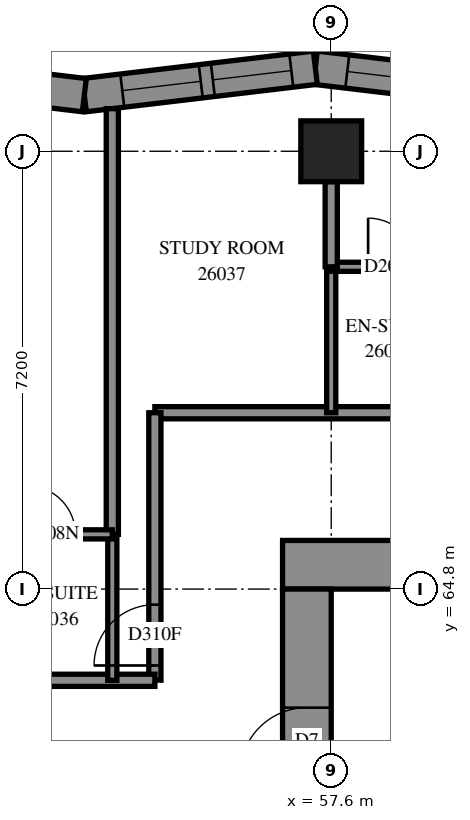
"""IFC4 building model, lengths in metres.
Left out: names, types, materials, properties, quantities, classifications, styles, units other than length and angle.
Written with IfcOpenShell. Run it as: python <this file> out.ifc"""

import sys

from ifc_helpers import new_model, si_unit, direction, frame, frame_2d, origin, origin_2d, place, context, subcontext, project, spatial, polyline, rectangle, outline, extrude, element, fill, save


model = new_model("IFC4")
c1 = context("Model", 3, precision=1e-05, world=origin(), true_north=direction((0.0, 1.0)))
c2 = subcontext(c1, "Body", "Model", "MODEL_VIEW")
j1 = project(units=[si_unit("LENGTHUNIT", "METRE"), si_unit("PLANEANGLEUNIT", "RADIAN")], contexts=[c1])
p1 = place(None, origin())
s1 = spatial("IfcSite", under=j1, at=p1, CompositionType="ELEMENT")
p2 = place(p1, origin())
s2 = spatial("IfcBuilding", under=s1, at=p2, CompositionType="ELEMENT")
p3 = place(p2, frame((0.0, 0.0, 98.2)))
s3 = spatial("IfcBuildingStorey", under=s2, at=p3, CompositionType="ELEMENT", Elevation=98.2)
p4 = place(p3, frame((57.6, 72.0, 0.0), z_axis=(0.0, 0.0, 1.0), x_axis=(1.0, 0.0, 0.0)))
e1 = element("IfcColumn", 1, at=p4, inside=s3, PredefinedType="COLUMN", context=c2, shape_type="SweptSolid", body=[
    extrude(rectangle(XDim=1.0, YDim=1.0, at=origin_2d()), origin(), (0.0, 0.0, 1.0), 3.1),
])
p5 = place(p3, frame((56.8, 65.2, -0.3), z_axis=(0.0, 0.0, 1.0), x_axis=(1.0, 0.0, 0.0)))
e2 = element("IfcWall", 2, at=p5, inside=s3, PredefinedType="SHEAR", context=c2, shape_type="SweptSolid", body=[
    extrude(rectangle(XDim=16.0, YDim=0.8, at=frame_2d((8.0, 0.0))), origin(), (0.0, 0.0, 1.0), 2.7),
])
p6 = place(p5, frame((10.8, 0.0, 0.3)))
e3 = element("IfcOpeningElement", 3, at=p6, cuts=e2, PredefinedType="OPENING", context=c2, shape_type="SweptSolid", body=[
    extrude(rectangle(XDim=0.8, YDim=2.1, at=frame_2d((0.4, 1.05))), frame((0.0, 0.41, 0.0), z_axis=(0.0, -1.0, 0.0), x_axis=(1.0, 0.0, 0.0)), (0.0, 0.0, 1.0), 0.82),
])
p7 = place(p3, frame((57.2, 50.4, -0.3), z_axis=(0.0, 0.0, 1.0), x_axis=(0.0, 1.0, 0.0)))
e4 = element("IfcWall", 4, at=p7, inside=s3, PredefinedType="SHEAR", context=c2, shape_type="SweptSolid", body=[
    extrude(rectangle(XDim=14.4, YDim=0.8, at=frame_2d((7.2, 0.0))), origin(), (0.0, 0.0, 1.0), 2.7),
])
p8 = place(p7, frame((4.55, 0.0, 0.3)))
e5 = element("IfcOpeningElement", 5, at=p8, cuts=e4, PredefinedType="OPENING", context=c2, shape_type="SweptSolid", body=[
    extrude(rectangle(XDim=1.1, YDim=2.1, at=frame_2d((0.55, 1.05))), frame((0.0, 0.41, 0.0), z_axis=(0.0, -1.0, 0.0), x_axis=(1.0, 0.0, 0.0)), (0.0, 0.0, 1.0), 0.82),
])
p9 = place(p7, frame((11.35, 0.0, 0.3)))
e6 = element("IfcOpeningElement", 6, at=p9, cuts=e4, PredefinedType="OPENING", context=c2, shape_type="SweptSolid", body=[
    extrude(rectangle(XDim=1.1, YDim=2.1, at=frame_2d((0.55, 1.05))), frame((0.0, 0.41, 0.0), z_axis=(0.0, -1.0, 0.0), x_axis=(1.0, 0.0, 0.0)), (0.0, 0.0, 1.0), 0.82),
])
p10 = place(p3, frame((61.138, 72.923, 0.0), z_axis=(0.0, 0.0, 1.0), x_axis=(-0.9930269402, 0.1178876415, 0.0)))
e7 = element("IfcWall", 7, at=p10, inside=s3, PredefinedType="SOLIDWALL", context=c2, shape_type="SweptSolid", body=[
    extrude(outline(polyline([(0.033, -0.275), (3.858, -0.275), (3.793, 0.275), (-0.033, 0.275), (0.033, -0.275)])), origin(), (0.0, 0.0, 1.0), 3.1),
])
p11 = place(p10, frame((0.496, 0.0, 0.5)))
e8 = element("IfcOpeningElement", 8, at=p11, cuts=e7, PredefinedType="OPENING", context=c2, shape_type="SweptSolid", body=[
    extrude(rectangle(XDim=1.3, YDim=2.45, at=frame_2d((0.65, 1.225))), frame((0.0, 0.285, 0.0), z_axis=(0.0, -1.0, 0.0), x_axis=(1.0, 0.0, 0.0)), (0.0, 0.0, 1.0), 0.57),
])
p12 = place(p10, frame((1.996, 0.0, 0.5)))
e9 = element("IfcOpeningElement", 9, at=p12, cuts=e7, PredefinedType="OPENING", context=c2, shape_type="SweptSolid", body=[
    extrude(rectangle(XDim=1.3, YDim=2.45, at=frame_2d((0.65, 1.225))), frame((0.0, 0.285, 0.0), z_axis=(0.0, -1.0, 0.0), x_axis=(1.0, 0.0, 0.0)), (0.0, 0.0, 1.0), 0.57),
])
p13 = place(p3, frame((57.339, 73.374, 0.0), z_axis=(0.0, 0.0, 1.0), x_axis=(-0.9930265769, -0.1178907016, 0.0)))
e10 = element("IfcWall", 10, at=p13, inside=s3, PredefinedType="SOLIDWALL", context=c2, shape_type="SweptSolid", body=[
    extrude(outline(polyline([(-0.033, -0.275), (3.793, -0.275), (3.858, 0.275), (0.033, 0.275), (-0.033, -0.275)])), origin(), (0.0, 0.0, 1.0), 3.1),
])
p14 = place(p13, frame((0.397, 0.0, 0.5)))
e11 = element("IfcOpeningElement", 11, at=p14, cuts=e10, PredefinedType="OPENING", context=c2, shape_type="SweptSolid", body=[
    extrude(rectangle(XDim=1.3, YDim=2.45, at=frame_2d((0.65, 1.225))), frame((0.0, 0.285, 0.0), z_axis=(0.0, -1.0, 0.0), x_axis=(1.0, 0.0, 0.0)), (0.0, 0.0, 1.0), 0.57),
])
p15 = place(p13, frame((1.897, 0.0, 0.5)))
e12 = element("IfcOpeningElement", 12, at=p15, cuts=e10, PredefinedType="OPENING", context=c2, shape_type="SweptSolid", body=[
    extrude(rectangle(XDim=1.3, YDim=2.45, at=frame_2d((0.65, 1.225))), frame((0.0, 0.285, 0.0), z_axis=(0.0, -1.0, 0.0), x_axis=(1.0, 0.0, 0.0)), (0.0, 0.0, 1.0), 0.57),
])
p16 = place(p3, frame((53.54, 72.923, 0.0), z_axis=(0.0, 0.0, 1.0), x_axis=(-0.9930269402, 0.1178876415, 0.0)))
e13 = element("IfcWall", 13, at=p16, inside=s3, PredefinedType="SOLIDWALL", context=c2, shape_type="SweptSolid", body=[
    extrude(outline(polyline([(0.033, -0.275), (3.858, -0.275), (3.793, 0.275), (-0.033, 0.275), (0.033, -0.275)])), origin(), (0.0, 0.0, 1.0), 3.1),
])
p17 = place(p16, frame((1.081, 0.0, 0.5)))
e14 = element("IfcOpeningElement", 14, at=p17, cuts=e13, PredefinedType="OPENING", context=c2, shape_type="SweptSolid", body=[
    extrude(rectangle(XDim=1.2, YDim=2.45, at=frame_2d((0.6, 1.225))), frame((0.0, 0.285, 0.0), z_axis=(0.0, -1.0, 0.0), x_axis=(1.0, 0.0, 0.0)), (0.0, 0.0, 1.0), 0.57),
])
p18 = place(p3, frame((54.7, 67.7, 0.0), z_axis=(0.0, 0.0, 1.0), x_axis=(1.0, 0.0, 0.0)))
e15 = element("IfcWall", 15, at=p18, inside=s3, PredefinedType="PARTITIONING", context=c2, shape_type="SweptSolid", body=[
    extrude(rectangle(XDim=20.2, YDim=0.2, at=frame_2d((10.1, 0.0))), origin(), (0.0, 0.0, 1.0), 3.1),
])
p19 = place(p18, frame((5.25, 0.0, 0.0)))
e16 = element("IfcOpeningElement", 16, at=p19, cuts=e15, PredefinedType="OPENING", context=c2, shape_type="SweptSolid", body=[
    extrude(rectangle(XDim=0.9, YDim=2.1, at=frame_2d((0.45, 1.05))), frame((0.0, 0.11, 0.0), z_axis=(0.0, -1.0, 0.0), x_axis=(1.0, 0.0, 0.0)), (0.0, 0.0, 1.0), 0.22),
])
p20 = place(p18, frame((6.9, 0.0, 0.0)))
e17 = element("IfcOpeningElement", 17, at=p20, cuts=e15, PredefinedType="OPENING", context=c2, shape_type="SweptSolid", body=[
    extrude(rectangle(XDim=0.9, YDim=2.1, at=frame_2d((0.45, 1.05))), frame((0.0, 0.11, 0.0), z_axis=(0.0, -1.0, 0.0), x_axis=(1.0, 0.0, 0.0)), (0.0, 0.0, 1.0), 0.22),
])
p21 = place(p18, frame((12.45, 0.0, 0.0)))
e18 = element("IfcOpeningElement", 18, at=p21, cuts=e15, PredefinedType="OPENING", context=c2, shape_type="SweptSolid", body=[
    extrude(rectangle(XDim=0.9, YDim=2.1, at=frame_2d((0.45, 1.05))), frame((0.0, 0.11, 0.0), z_axis=(0.0, -1.0, 0.0), x_axis=(1.0, 0.0, 0.0)), (0.0, 0.0, 1.0), 0.22),
])
p22 = place(p18, frame((14.1, 0.0, 0.0)))
e19 = element("IfcOpeningElement", 19, at=p22, cuts=e15, PredefinedType="OPENING", context=c2, shape_type="SweptSolid", body=[
    extrude(rectangle(XDim=0.9, YDim=2.1, at=frame_2d((0.45, 1.05))), frame((0.0, 0.11, 0.0), z_axis=(0.0, -1.0, 0.0), x_axis=(1.0, 0.0, 0.0)), (0.0, 0.0, 1.0), 0.22),
])
p23 = place(p3, frame((54.0, 65.7, 0.0), z_axis=(0.0, 0.0, 1.0), x_axis=(0.0, 1.0, 0.0)))
e20 = element("IfcWall", 20, at=p23, inside=s3, PredefinedType="PARTITIONING", context=c2, shape_type="SweptSolid", body=[
    extrude(rectangle(XDim=7.001, YDim=0.2, at=frame_2d((3.5, 0.0))), origin(), (0.0, 0.0, 1.0), 3.1),
])
p24 = place(p3, frame((54.7, 63.302, 0.0), z_axis=(0.0, 0.0, 1.0), x_axis=(0.0, 1.0, 0.0)))
e21 = element("IfcWall", 21, at=p24, inside=s3, PredefinedType="PARTITIONING", context=c2, shape_type="SweptSolid", body=[
    extrude(rectangle(XDim=4.398, YDim=0.2, at=frame_2d((2.199, 0.0))), origin(), (0.0, 0.0, 1.0), 3.1),
])
p25 = place(p24, frame((0.242, 0.0, 0.0)))
e22 = element("IfcOpeningElement", 22, at=p25, cuts=e21, PredefinedType="OPENING", context=c2, shape_type="SweptSolid", body=[
    extrude(rectangle(XDim=1.0, YDim=2.1, at=frame_2d((0.5, 1.05))), frame((0.0, 0.11, 0.0), z_axis=(0.0, -1.0, 0.0), x_axis=(1.0, 0.0, 0.0)), (0.0, 0.0, 1.0), 0.22),
])
p26 = place(p3, frame((50.4, 63.3, 0.0), z_axis=(0.0, 0.0, 1.0), x_axis=(1.0, 0.0, 0.0)))
e23 = element("IfcWall", 23, at=p26, inside=s3, PredefinedType="PARTITIONING", context=c2, shape_type="SweptSolid", body=[
    extrude(rectangle(XDim=4.3, YDim=0.2, at=frame_2d((2.15, 0.0))), origin(), (0.0, 0.0, 1.0), 3.1),
])
p27 = place(p26, frame((0.552, 0.0, 0.0)))
e24 = element("IfcOpeningElement", 24, at=p27, cuts=e23, PredefinedType="OPENING", context=c2, shape_type="SweptSolid", body=[
    extrude(rectangle(XDim=0.9, YDim=2.1, at=frame_2d((0.45, 1.05))), frame((0.0, 0.11, 0.0), z_axis=(0.0, -1.0, 0.0), x_axis=(1.0, 0.0, 0.0)), (0.0, 0.0, 1.0), 0.22),
])
for number, where, z_axis, x_axis in (
    (25, (54.0, 63.3, 0.0), (0.0, 0.0, 1.0), (0.0, 1.0, 0.0)),
    (26, (57.6, 67.7, 0.0), (0.0, 0.0, 1.0), (0.0, 1.0, 0.0)),
):
    element("IfcWall", number, at=place(p3, frame(where, z_axis=z_axis, x_axis=x_axis)), inside=s3, PredefinedType="PARTITIONING", context=c2, shape_type="SweptSolid", body=[
        extrude(rectangle(XDim=2.4, YDim=0.15, at=frame_2d((1.2, 0.0))), origin(), (0.0, 0.0, 1.0), 3.1),
    ])
p28 = place(p3, frame((52.1, 65.7, 0.0), z_axis=(0.0, 0.0, 1.0), x_axis=(1.0, 0.0, 0.0)))
e27 = element("IfcWall", 27, at=p28, inside=s3, PredefinedType="PARTITIONING", context=c2, shape_type="SweptSolid", body=[
    extrude(rectangle(XDim=1.9, YDim=0.15, at=frame_2d((0.95, 0.0))), origin(), (0.0, 0.0, 1.0), 3.1),
])
p29 = place(p28, frame((0.493, 0.0, 0.0)))
e28 = element("IfcOpeningElement", 28, at=p29, cuts=e27, PredefinedType="OPENING", context=c2, shape_type="SweptSolid", body=[
    extrude(rectangle(XDim=0.8, YDim=2.1, at=frame_2d((0.4, 1.05))), frame((0.0, 0.085, 0.0), z_axis=(0.0, -1.0, 0.0), x_axis=(1.0, 0.0, 0.0)), (0.0, 0.0, 1.0), 0.17),
])
p30 = place(p3, frame((57.6, 70.1, 0.0), z_axis=(0.0, 0.0, 1.0), x_axis=(1.0, 0.0, 0.0)))
e29 = element("IfcWall", 29, at=p30, inside=s3, PredefinedType="PARTITIONING", context=c2, shape_type="SweptSolid", body=[
    extrude(rectangle(XDim=1.9, YDim=0.15, at=frame_2d((0.95, 0.0))), origin(), (0.0, 0.0, 1.0), 3.1),
])
p31 = place(p30, frame((0.607, 0.0, 0.0)))
e30 = element("IfcOpeningElement", 30, at=p31, cuts=e29, PredefinedType="OPENING", context=c2, shape_type="SweptSolid", body=[
    extrude(rectangle(XDim=0.8, YDim=2.1, at=frame_2d((0.4, 1.05))), frame((0.0, 0.085, 0.0), z_axis=(0.0, -1.0, 0.0), x_axis=(1.0, 0.0, 0.0)), (0.0, 0.0, 1.0), 0.17),
])
p32 = place(p3, frame((57.6, 70.1, 0.0), z_axis=(0.0, 0.0, 1.0), x_axis=(0.0, 1.0, 0.0)))
e31 = element("IfcWall", 31, at=p32, inside=s3, PredefinedType="PARTITIONING", context=c2, shape_type="SweptSolid", body=[
    extrude(rectangle(XDim=1.4, YDim=0.2, at=frame_2d((0.7, 0.0))), origin(), (0.0, 0.0, 1.0), 3.1),
])
p33 = place(p12, origin())
e32 = element("IfcWindow", 32, at=p33, inside=s3, PartitioningType="SINGLE_PANEL", PredefinedType="WINDOW", context=c2, shape_type="SweptSolid", body=[
    extrude(rectangle(XDim=1.3, YDim=2.45, at=frame_2d((0.65, 1.225))), frame((0.0, 0.155, 0.0), z_axis=(0.0, -1.0, 0.0), x_axis=(1.0, 0.0, 0.0)), (0.0, 0.0, 1.0), 0.06),
])
fill(e9, e32)
p34 = place(p14, origin())
e33 = element("IfcWindow", 33, at=p34, inside=s3, PartitioningType="SINGLE_PANEL", PredefinedType="WINDOW", context=c2, shape_type="SweptSolid", body=[
    extrude(rectangle(XDim=1.3, YDim=2.45, at=frame_2d((0.65, 1.225))), frame((0.0, 0.155, 0.0), z_axis=(0.0, -1.0, 0.0), x_axis=(1.0, 0.0, 0.0)), (0.0, 0.0, 1.0), 0.06),
])
fill(e11, e33)
p35 = place(p15, origin())
e34 = element("IfcWindow", 34, at=p35, inside=s3, PartitioningType="SINGLE_PANEL", PredefinedType="WINDOW", context=c2, shape_type="SweptSolid", body=[
    extrude(rectangle(XDim=1.3, YDim=2.45, at=frame_2d((0.65, 1.225))), frame((0.0, 0.155, 0.0), z_axis=(0.0, -1.0, 0.0), x_axis=(1.0, 0.0, 0.0)), (0.0, 0.0, 1.0), 0.06),
])
fill(e12, e34)
p36 = place(p9, origin())
e35 = element("IfcDoor", 35, at=p36, inside=s3, OperationType="SINGLE_SWING_LEFT", PredefinedType="DOOR", context=c2, shape_type="SweptSolid", body=[
    extrude(rectangle(XDim=1.1, YDim=2.1, at=frame_2d((0.55, 1.05))), frame((0.0, 0.025, 0.0), z_axis=(0.0, -1.0, 0.0), x_axis=(1.0, 0.0, 0.0)), (0.0, 0.0, 1.0), 0.05),
])
fill(e6, e35)
p37 = place(p29, origin())
e36 = element("IfcDoor", 36, at=p37, inside=s3, OperationType="SINGLE_SWING_RIGHT", PredefinedType="DOOR", context=c2, shape_type="SweptSolid", body=[
    extrude(rectangle(XDim=0.8, YDim=2.1, at=frame_2d((0.4, 1.05))), frame((0.0, 0.025, 0.0), z_axis=(0.0, -1.0, 0.0), x_axis=(1.0, 0.0, 0.0)), (0.0, 0.0, 1.0), 0.05),
])
fill(e28, e36)
p38 = place(p25, origin())
e37 = element("IfcDoor", 37, at=p38, inside=s3, OperationType="SINGLE_SWING_LEFT", PredefinedType="DOOR", context=c2, shape_type="SweptSolid", body=[
    extrude(rectangle(XDim=1.0, YDim=2.1, at=frame_2d((0.5, 1.05))), frame((0.0, 0.025, 0.0), z_axis=(0.0, -1.0, 0.0), x_axis=(1.0, 0.0, 0.0)), (0.0, 0.0, 1.0), 0.05),
])
fill(e22, e37)
p39 = place(p31, origin())
e38 = element("IfcDoor", 38, at=p39, inside=s3, OperationType="SINGLE_SWING_RIGHT", PredefinedType="DOOR", context=c2, shape_type="SweptSolid", body=[
    extrude(rectangle(XDim=0.8, YDim=2.1, at=frame_2d((0.4, 1.05))), frame((0.0, 0.025, 0.0), z_axis=(0.0, -1.0, 0.0), x_axis=(1.0, 0.0, 0.0)), (0.0, 0.0, 1.0), 0.05),
])
fill(e30, e38)
save(model, sys.argv[1])
